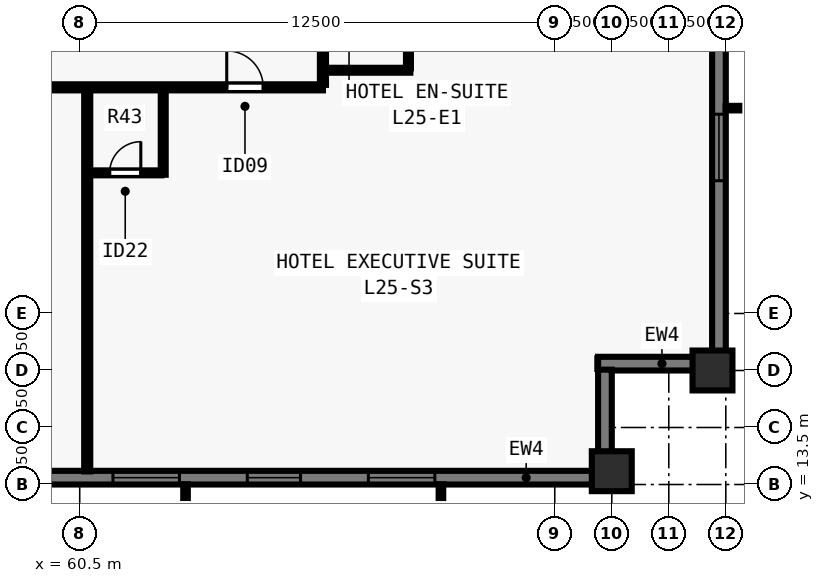
"""IFC4 building model, lengths in metres.
Left out: names, types, materials, properties, quantities, classifications, styles, units other than length and angle.
Written with IfcOpenShell. Run it as: python <this file> out.ifc"""

import sys

from ifc_helpers import new_model, si_unit, direction, frame, frame_2d, origin, origin_2d, place, context, subcontext, project, spatial, rectangle, extrude, element, fill, save


model = new_model("IFC4")
c1 = context("Model", 3, precision=1e-05, world=origin(), true_north=direction((0.0, 1.0)))
c2 = subcontext(c1, "Body", "Model", "MODEL_VIEW")
j1 = project(units=[si_unit("LENGTHUNIT", "METRE"), si_unit("PLANEANGLEUNIT", "RADIAN")], contexts=[c1])
p1 = place(None, origin())
s1 = spatial("IfcSite", under=j1, at=p1, CompositionType="ELEMENT")
p2 = place(p1, origin())
s2 = spatial("IfcBuilding", under=s1, at=p2, CompositionType="ELEMENT")
p3 = place(p2, frame((0.0, 0.0, 93.5)))
s3 = spatial("IfcBuildingStorey", under=s2, at=p3, CompositionType="ELEMENT", Elevation=93.5)
for number, where, z_axis, x_axis in (
    (1, (74.5, 13.85, 0.0), (0.0, 0.0, 1.0), (1.0, 0.0, 0.0)),
    (2, (77.15, 16.5, 0.0), (0.0, 0.0, 1.0), (0.0, 1.0, 0.0)),
):
    element("IfcColumn", number, at=place(p3, frame(where, z_axis=z_axis, x_axis=x_axis)), inside=s3, PredefinedType="COLUMN", context=c2, shape_type="SweptSolid", body=[
        extrude(rectangle(XDim=1.05, YDim=1.05, at=origin_2d()), origin(), (0.0, 0.0, 1.0), 3.5),
    ])
p4 = place(p3, frame((77.32, 61.5, 0.0), z_axis=(0.0, 0.0, 1.0), x_axis=(0.0, -1.0, 0.0)))
e3 = element("IfcWall", 3, at=p4, inside=s3, PredefinedType="SOLIDWALL", context=c2, shape_type="SweptSolid", body=[
    extrude(rectangle(XDim=44.662, YDim=0.36, at=frame_2d((22.331, 0.0))), origin(), (0.0, 0.0, 1.0), 3.24),
])
p5 = place(p4, frame((8.19, 0.0, 0.8)))
e4 = element("IfcOpeningElement", 4, at=p5, cuts=e3, PredefinedType="OPENING", context=c2, shape_type="SweptSolid", body=[
    extrude(rectangle(XDim=1.4, YDim=1.504, at=frame_2d((0.7, 0.752))), frame((0.0, 0.19, 0.0), z_axis=(0.0, -1.0, 0.0), x_axis=(1.0, 0.0, 0.0)), (0.0, 0.0, 1.0), 0.38),
])
p6 = place(p4, frame((11.375, 0.0, 0.8)))
e5 = element("IfcOpeningElement", 5, at=p6, cuts=e3, PredefinedType="OPENING", context=c2, shape_type="SweptSolid", body=[
    extrude(rectangle(XDim=1.75, YDim=1.504, at=frame_2d((0.875, 0.752))), frame((0.0, 0.19, 0.0), z_axis=(0.0, -1.0, 0.0), x_axis=(1.0, 0.0, 0.0)), (0.0, 0.0, 1.0), 0.38),
])
p7 = place(p4, frame((14.911, 0.0, 0.8)))
e6 = element("IfcOpeningElement", 6, at=p7, cuts=e3, PredefinedType="OPENING", context=c2, shape_type="SweptSolid", body=[
    extrude(rectangle(XDim=1.4, YDim=1.504, at=frame_2d((0.7, 0.752))), frame((0.0, 0.19, 0.0), z_axis=(0.0, -1.0, 0.0), x_axis=(1.0, 0.0, 0.0)), (0.0, 0.0, 1.0), 0.38),
])
p8 = place(p4, frame((21.631, 0.0, 0.8)))
e7 = element("IfcOpeningElement", 7, at=p8, cuts=e3, PredefinedType="OPENING", context=c2, shape_type="SweptSolid", body=[
    extrude(rectangle(XDim=1.4, YDim=1.504, at=frame_2d((0.7, 0.752))), frame((0.0, 0.19, 0.0), z_axis=(0.0, -1.0, 0.0), x_axis=(1.0, 0.0, 0.0)), (0.0, 0.0, 1.0), 0.38),
])
p9 = place(p4, frame((23.566, 0.0, 0.8)))
e8 = element("IfcOpeningElement", 8, at=p9, cuts=e3, PredefinedType="OPENING", context=c2, shape_type="SweptSolid", body=[
    extrude(rectangle(XDim=1.75, YDim=1.504, at=frame_2d((0.875, 0.752))), frame((0.0, 0.19, 0.0), z_axis=(0.0, -1.0, 0.0), x_axis=(1.0, 0.0, 0.0)), (0.0, 0.0, 1.0), 0.38),
])
p10 = place(p4, frame((28.351, 0.0, 0.8)))
e9 = element("IfcOpeningElement", 9, at=p10, cuts=e3, PredefinedType="OPENING", context=c2, shape_type="SweptSolid", body=[
    extrude(rectangle(XDim=1.4, YDim=1.504, at=frame_2d((0.7, 0.752))), frame((0.0, 0.19, 0.0), z_axis=(0.0, -1.0, 0.0), x_axis=(1.0, 0.0, 0.0)), (0.0, 0.0, 1.0), 0.38),
])
p11 = place(p4, frame((31.987, 0.0, 0.8)))
e10 = element("IfcOpeningElement", 10, at=p11, cuts=e3, PredefinedType="OPENING", context=c2, shape_type="SweptSolid", body=[
    extrude(rectangle(XDim=1.75, YDim=1.504, at=frame_2d((0.875, 0.752))), frame((0.0, 0.19, 0.0), z_axis=(0.0, -1.0, 0.0), x_axis=(1.0, 0.0, 0.0)), (0.0, 0.0, 1.0), 0.38),
])
p12 = place(p4, frame((35.072, 0.0, 0.8)))
e11 = element("IfcOpeningElement", 11, at=p12, cuts=e3, PredefinedType="OPENING", context=c2, shape_type="SweptSolid", body=[
    extrude(rectangle(XDim=1.4, YDim=1.504, at=frame_2d((0.7, 0.752))), frame((0.0, 0.19, 0.0), z_axis=(0.0, -1.0, 0.0), x_axis=(1.0, 0.0, 0.0)), (0.0, 0.0, 1.0), 0.38),
])
p13 = place(p4, frame((38.257, 0.0, 0.8)))
e12 = element("IfcOpeningElement", 12, at=p13, cuts=e3, PredefinedType="OPENING", context=c2, shape_type="SweptSolid", body=[
    extrude(rectangle(XDim=1.75, YDim=1.504, at=frame_2d((0.875, 0.752))), frame((0.0, 0.19, 0.0), z_axis=(0.0, -1.0, 0.0), x_axis=(1.0, 0.0, 0.0)), (0.0, 0.0, 1.0), 0.38),
])
p14 = place(p3, frame((77.5, 16.68, 0.0), z_axis=(0.0, 0.0, 1.0), x_axis=(-1.0, 0.0, 0.0)))
e13 = element("IfcWall", 13, at=p14, inside=s3, PredefinedType="SOLIDWALL", context=c2, shape_type="SweptSolid", body=[
    extrude(rectangle(XDim=3.36, YDim=0.36, at=frame_2d((1.68, 0.0))), origin(), (0.0, 0.0, 1.0), 3.24),
])
p15 = place(p3, frame((74.32, 16.522, 0.0), z_axis=(0.0, 0.0, 1.0), x_axis=(0.0, -1.0, 0.0)))
e14 = element("IfcWall", 14, at=p15, inside=s3, PredefinedType="SOLIDWALL", context=c2, shape_type="SweptSolid", body=[
    extrude(rectangle(XDim=2.684, YDim=0.36, at=frame_2d((1.342, 0.0))), origin(), (0.0, 0.0, 1.0), 3.24),
])
p16 = place(p3, frame((74.5, 13.68, 0.0), z_axis=(0.0, 0.0, 1.0), x_axis=(-1.0, 0.0, 0.0)))
e15 = element("IfcWall", 15, at=p16, inside=s3, PredefinedType="SOLIDWALL", context=c2, shape_type="SweptSolid", body=[
    extrude(rectangle(XDim=44.662, YDim=0.36, at=frame_2d((22.331, 0.0))), origin(), (0.0, 0.0, 1.0), 3.24),
])
p17 = place(p16, frame((4.655, 0.0, 0.8)))
e16 = element("IfcOpeningElement", 16, at=p17, cuts=e15, PredefinedType="OPENING", context=c2, shape_type="SweptSolid", body=[
    extrude(rectangle(XDim=1.75, YDim=1.504, at=frame_2d((0.875, 0.752))), frame((0.0, 0.19, 0.0), z_axis=(0.0, -1.0, 0.0), x_axis=(1.0, 0.0, 0.0)), (0.0, 0.0, 1.0), 0.38),
])
p18 = place(p16, frame((8.19, 0.0, 0.8)))
e17 = element("IfcOpeningElement", 17, at=p18, cuts=e15, PredefinedType="OPENING", context=c2, shape_type="SweptSolid", body=[
    extrude(rectangle(XDim=1.4, YDim=1.504, at=frame_2d((0.7, 0.752))), frame((0.0, 0.19, 0.0), z_axis=(0.0, -1.0, 0.0), x_axis=(1.0, 0.0, 0.0)), (0.0, 0.0, 1.0), 0.38),
])
p19 = place(p16, frame((11.375, 0.0, 0.8)))
e18 = element("IfcOpeningElement", 18, at=p19, cuts=e15, PredefinedType="OPENING", context=c2, shape_type="SweptSolid", body=[
    extrude(rectangle(XDim=1.75, YDim=1.504, at=frame_2d((0.875, 0.752))), frame((0.0, 0.19, 0.0), z_axis=(0.0, -1.0, 0.0), x_axis=(1.0, 0.0, 0.0)), (0.0, 0.0, 1.0), 0.38),
])
p20 = place(p16, frame((14.911, 0.0, 0.8)))
e19 = element("IfcOpeningElement", 19, at=p20, cuts=e15, PredefinedType="OPENING", context=c2, shape_type="SweptSolid", body=[
    extrude(rectangle(XDim=1.4, YDim=1.504, at=frame_2d((0.7, 0.752))), frame((0.0, 0.19, 0.0), z_axis=(0.0, -1.0, 0.0), x_axis=(1.0, 0.0, 0.0)), (0.0, 0.0, 1.0), 0.38),
])
p21 = place(p16, frame((18.546, 0.0, 0.8)))
e20 = element("IfcOpeningElement", 20, at=p21, cuts=e15, PredefinedType="OPENING", context=c2, shape_type="SweptSolid", body=[
    extrude(rectangle(XDim=1.75, YDim=1.504, at=frame_2d((0.875, 0.752))), frame((0.0, 0.19, 0.0), z_axis=(0.0, -1.0, 0.0), x_axis=(1.0, 0.0, 0.0)), (0.0, 0.0, 1.0), 0.38),
])
p22 = place(p16, frame((21.631, 0.0, 0.8)))
e21 = element("IfcOpeningElement", 21, at=p22, cuts=e15, PredefinedType="OPENING", context=c2, shape_type="SweptSolid", body=[
    extrude(rectangle(XDim=1.4, YDim=1.504, at=frame_2d((0.7, 0.752))), frame((0.0, 0.19, 0.0), z_axis=(0.0, -1.0, 0.0), x_axis=(1.0, 0.0, 0.0)), (0.0, 0.0, 1.0), 0.38),
])
p23 = place(p16, frame((24.366, 0.0, 0.8)))
e22 = element("IfcOpeningElement", 22, at=p23, cuts=e15, PredefinedType="OPENING", context=c2, shape_type="SweptSolid", body=[
    extrude(rectangle(XDim=1.75, YDim=1.504, at=frame_2d((0.875, 0.752))), frame((0.0, 0.19, 0.0), z_axis=(0.0, -1.0, 0.0), x_axis=(1.0, 0.0, 0.0)), (0.0, 0.0, 1.0), 0.38),
])
p24 = place(p16, frame((28.351, 0.0, 0.8)))
e23 = element("IfcOpeningElement", 23, at=p24, cuts=e15, PredefinedType="OPENING", context=c2, shape_type="SweptSolid", body=[
    extrude(rectangle(XDim=1.4, YDim=1.504, at=frame_2d((0.7, 0.752))), frame((0.0, 0.19, 0.0), z_axis=(0.0, -1.0, 0.0), x_axis=(1.0, 0.0, 0.0)), (0.0, 0.0, 1.0), 0.38),
])
p25 = place(p16, frame((31.987, 0.0, 0.8)))
e24 = element("IfcOpeningElement", 24, at=p25, cuts=e15, PredefinedType="OPENING", context=c2, shape_type="SweptSolid", body=[
    extrude(rectangle(XDim=1.75, YDim=1.504, at=frame_2d((0.875, 0.752))), frame((0.0, 0.19, 0.0), z_axis=(0.0, -1.0, 0.0), x_axis=(1.0, 0.0, 0.0)), (0.0, 0.0, 1.0), 0.38),
])
p26 = place(p16, frame((35.072, 0.0, 0.8)))
e25 = element("IfcOpeningElement", 25, at=p26, cuts=e15, PredefinedType="OPENING", context=c2, shape_type="SweptSolid", body=[
    extrude(rectangle(XDim=1.4, YDim=1.504, at=frame_2d((0.7, 0.752))), frame((0.0, 0.19, 0.0), z_axis=(0.0, -1.0, 0.0), x_axis=(1.0, 0.0, 0.0)), (0.0, 0.0, 1.0), 0.38),
])
p27 = place(p16, frame((38.257, 0.0, 0.8)))
e26 = element("IfcOpeningElement", 26, at=p27, cuts=e15, PredefinedType="OPENING", context=c2, shape_type="SweptSolid", body=[
    extrude(rectangle(XDim=1.75, YDim=1.504, at=frame_2d((0.875, 0.752))), frame((0.0, 0.19, 0.0), z_axis=(0.0, -1.0, 0.0), x_axis=(1.0, 0.0, 0.0)), (0.0, 0.0, 1.0), 0.38),
])
p28 = place(p3, frame((37.1, 23.95, 0.0), z_axis=(0.0, 0.0, 1.0), x_axis=(1.0, 0.0, 0.0)))
e27 = element("IfcWall", 27, at=p28, inside=s3, PredefinedType="PARTITIONING", context=c2, shape_type="SweptSolid", body=[
    extrude(rectangle(XDim=29.8, YDim=0.16, at=frame_2d((14.9, 0.0))), origin(), (0.0, 0.0, 1.0), 3.24),
])
p29 = place(p28, frame((2.571, 0.0, 0.0)))
e28 = element("IfcOpeningElement", 28, at=p29, cuts=e27, PredefinedType="OPENING", context=c2, shape_type="SweptSolid", body=[
    extrude(rectangle(XDim=0.96, YDim=2.15, at=frame_2d((0.48, 1.075))), frame((0.0, 0.09, 0.0), z_axis=(0.0, -1.0, 0.0), x_axis=(1.0, 0.0, 0.0)), (0.0, 0.0, 1.0), 0.18),
])
p30 = place(p28, frame((15.42, 0.0, 0.0)))
e29 = element("IfcOpeningElement", 29, at=p30, cuts=e27, PredefinedType="OPENING", context=c2, shape_type="SweptSolid", body=[
    extrude(rectangle(XDim=0.96, YDim=2.15, at=frame_2d((0.48, 1.075))), frame((0.0, 0.09, 0.0), z_axis=(0.0, -1.0, 0.0), x_axis=(1.0, 0.0, 0.0)), (0.0, 0.0, 1.0), 0.18),
])
p31 = place(p28, frame((27.269, 0.0, 0.0)))
e30 = element("IfcOpeningElement", 30, at=p31, cuts=e27, PredefinedType="OPENING", context=c2, shape_type="SweptSolid", body=[
    extrude(rectangle(XDim=0.96, YDim=2.15, at=frame_2d((0.48, 1.075))), frame((0.0, 0.09, 0.0), z_axis=(0.0, -1.0, 0.0), x_axis=(1.0, 0.0, 0.0)), (0.0, 0.0, 1.0), 0.18),
])
p32 = place(p3, frame((66.9, 24.015, 0.0), z_axis=(0.0, 0.0, 1.0), x_axis=(0.0, 1.0, 0.0)))
e31 = element("IfcWall", 31, at=p32, inside=s3, PredefinedType="PARTITIONING", context=c2, shape_type="SweptSolid", body=[
    extrude(rectangle(XDim=29.97, YDim=0.16, at=frame_2d((14.985, 0.0))), origin(), (0.0, 0.0, 1.0), 3.24),
])
p33 = place(p32, frame((3.911, 0.0, 0.0)))
e32 = element("IfcOpeningElement", 32, at=p33, cuts=e31, PredefinedType="OPENING", context=c2, shape_type="SweptSolid", body=[
    extrude(rectangle(XDim=0.96, YDim=2.15, at=frame_2d((0.48, 1.075))), frame((0.0, 0.09, 0.0), z_axis=(0.0, -1.0, 0.0), x_axis=(1.0, 0.0, 0.0)), (0.0, 0.0, 1.0), 0.18),
])
p34 = place(p32, frame((9.544, 0.0, 0.0)))
e33 = element("IfcOpeningElement", 33, at=p34, cuts=e31, PredefinedType="OPENING", context=c2, shape_type="SweptSolid", body=[
    extrude(rectangle(XDim=0.96, YDim=2.15, at=frame_2d((0.48, 1.075))), frame((0.0, 0.09, 0.0), z_axis=(0.0, -1.0, 0.0), x_axis=(1.0, 0.0, 0.0)), (0.0, 0.0, 1.0), 0.18),
])
p35 = place(p32, frame((15.625, 0.0, 0.0)))
e34 = element("IfcOpeningElement", 34, at=p35, cuts=e31, PredefinedType="OPENING", context=c2, shape_type="SweptSolid", body=[
    extrude(rectangle(XDim=0.96, YDim=2.15, at=frame_2d((0.48, 1.075))), frame((0.0, 0.09, 0.0), z_axis=(0.0, -1.0, 0.0), x_axis=(1.0, 0.0, 0.0)), (0.0, 0.0, 1.0), 0.18),
])
p36 = place(p32, frame((21.584, 0.0, 0.0)))
e35 = element("IfcOpeningElement", 35, at=p36, cuts=e31, PredefinedType="OPENING", context=c2, shape_type="SweptSolid", body=[
    extrude(rectangle(XDim=0.96, YDim=2.15, at=frame_2d((0.48, 1.075))), frame((0.0, 0.09, 0.0), z_axis=(0.0, -1.0, 0.0), x_axis=(1.0, 0.0, 0.0)), (0.0, 0.0, 1.0), 0.18),
])
p37 = place(p32, frame((27.494, 0.0, 0.0)))
e36 = element("IfcOpeningElement", 36, at=p37, cuts=e31, PredefinedType="OPENING", context=c2, shape_type="SweptSolid", body=[
    extrude(rectangle(XDim=0.96, YDim=2.15, at=frame_2d((0.48, 1.075))), frame((0.0, 0.09, 0.0), z_axis=(0.0, -1.0, 0.0), x_axis=(1.0, 0.0, 0.0)), (0.0, 0.0, 1.0), 0.18),
])
p38 = place(p3, frame((60.698, 13.845, 0.0), z_axis=(0.0, 0.0, 1.0), x_axis=(0.0, 1.0, 0.0)))
e37 = element("IfcWall", 37, at=p38, inside=s3, PredefinedType="PARTITIONING", context=c2, shape_type="SweptSolid", body=[
    extrude(rectangle(XDim=10.04, YDim=0.16, at=frame_2d((5.02, 0.0))), origin(), (0.0, 0.0, 1.0), 3.24),
])
p39 = place(p3, frame((62.698, 21.65, 0.0), z_axis=(0.0, 0.0, 1.0), x_axis=(0.0, 1.0, 0.0)))
e38 = element("IfcWall", 38, at=p39, inside=s3, PredefinedType="PLUMBINGWALL", context=c2, shape_type="SweptSolid", body=[
    extrude(rectangle(XDim=2.235, YDim=0.13, at=frame_2d((1.118, 0.0))), origin(), (0.0, 0.0, 1.0), 3.24),
])
p40 = place(p3, frame((60.762, 21.7, 0.0), z_axis=(0.0, 0.0, 1.0), x_axis=(1.0, 0.0, 0.0)))
e39 = element("IfcWall", 39, at=p40, inside=s3, PredefinedType="PLUMBINGWALL", context=c2, shape_type="SweptSolid", body=[
    extrude(rectangle(XDim=1.885, YDim=0.13, at=frame_2d((0.942, 0.0))), origin(), (0.0, 0.0, 1.0), 3.24),
])
p41 = place(p40, frame((0.525, 0.0, 0.0)))
e40 = element("IfcOpeningElement", 40, at=p41, cuts=e39, PredefinedType="OPENING", context=c2, shape_type="SweptSolid", body=[
    extrude(rectangle(XDim=0.82, YDim=2.1, at=frame_2d((0.41, 1.05))), frame((0.0, 0.075, 0.0), z_axis=(0.0, -1.0, 0.0), x_axis=(1.0, 0.0, 0.0)), (0.0, 0.0, 1.0), 0.15),
])
p42 = place(p3, frame((66.965, 24.4, 0.0), z_axis=(0.0, 0.0, 1.0), x_axis=(1.0, 0.0, 0.0)))
e41 = element("IfcWall", 41, at=p42, inside=s3, PredefinedType="PLUMBINGWALL", context=c2, shape_type="SweptSolid", body=[
    extrude(rectangle(XDim=2.235, YDim=0.13, at=frame_2d((1.117, 0.0))), origin(), (0.0, 0.0, 1.0), 2.809),
])
p43 = place(p3, frame((69.15, 24.45, 0.0), z_axis=(0.0, 0.0, 1.0), x_axis=(0.0, 1.0, 0.0)))
e42 = element("IfcWall", 42, at=p43, inside=s3, PredefinedType="PLUMBINGWALL", context=c2, shape_type="SweptSolid", body=[
    extrude(rectangle(XDim=1.9, YDim=0.13, at=frame_2d((0.95, 0.0))), origin(), (0.0, 0.0, 1.0), 3.24),
])
p44 = place(p43, frame((0.54, 0.0, 0.0)))
e43 = element("IfcOpeningElement", 43, at=p44, cuts=e42, PredefinedType="OPENING", context=c2, shape_type="SweptSolid", body=[
    extrude(rectangle(XDim=0.82, YDim=2.1, at=frame_2d((0.41, 1.05))), frame((0.0, 0.075, 0.0), z_axis=(0.0, -1.0, 0.0), x_axis=(1.0, 0.0, 0.0)), (0.0, 0.0, 1.0), 0.15),
])
p45 = place(p13, origin())
e44 = element("IfcWindow", 44, at=p45, inside=s3, PartitioningType="SINGLE_PANEL", PredefinedType="WINDOW", context=c2, shape_type="SweptSolid", body=[
    extrude(rectangle(XDim=1.75, YDim=1.504, at=frame_2d((0.875, 0.752))), frame((0.0, -0.05, 0.0), z_axis=(0.0, -1.0, 0.0), x_axis=(1.0, 0.0, 0.0)), (0.0, 0.0, 1.0), 0.06),
])
fill(e12, e44)
p46 = place(p17, origin())
e45 = element("IfcWindow", 45, at=p46, inside=s3, PartitioningType="SINGLE_PANEL", PredefinedType="WINDOW", context=c2, shape_type="SweptSolid", body=[
    extrude(rectangle(XDim=1.75, YDim=1.504, at=frame_2d((0.875, 0.752))), frame((0.0, -0.05, 0.0), z_axis=(0.0, -1.0, 0.0), x_axis=(1.0, 0.0, 0.0)), (0.0, 0.0, 1.0), 0.06),
])
fill(e16, e45)
p47 = place(p18, origin())
e46 = element("IfcWindow", 46, at=p47, inside=s3, PartitioningType="SINGLE_PANEL", PredefinedType="WINDOW", context=c2, shape_type="SweptSolid", body=[
    extrude(rectangle(XDim=1.4, YDim=1.504, at=frame_2d((0.7, 0.752))), frame((0.0, -0.05, 0.0), z_axis=(0.0, -1.0, 0.0), x_axis=(1.0, 0.0, 0.0)), (0.0, 0.0, 1.0), 0.06),
])
fill(e17, e46)
p48 = place(p19, origin())
e47 = element("IfcWindow", 47, at=p48, inside=s3, PartitioningType="SINGLE_PANEL", PredefinedType="WINDOW", context=c2, shape_type="SweptSolid", body=[
    extrude(rectangle(XDim=1.75, YDim=1.504, at=frame_2d((0.875, 0.752))), frame((0.0, -0.05, 0.0), z_axis=(0.0, -1.0, 0.0), x_axis=(1.0, 0.0, 0.0)), (0.0, 0.0, 1.0), 0.06),
])
fill(e18, e47)
p49 = place(p41, origin())
e48 = element("IfcDoor", 48, at=p49, inside=s3, OperationType="SINGLE_SWING_RIGHT", PredefinedType="DOOR", context=c2, shape_type="SweptSolid", body=[
    extrude(rectangle(XDim=0.82, YDim=2.1, at=frame_2d((0.41, 1.05))), frame((0.0, 0.025, 0.0), z_axis=(0.0, -1.0, 0.0), x_axis=(1.0, 0.0, 0.0)), (0.0, 0.0, 1.0), 0.05),
])
fill(e40, e48)
p50 = place(p31, origin())
e49 = element("IfcDoor", 49, at=p50, inside=s3, OperationType="SINGLE_SWING_LEFT", PredefinedType="DOOR", context=c2, shape_type="SweptSolid", body=[
    extrude(rectangle(XDim=0.96, YDim=2.15, at=frame_2d((0.48, 1.075))), frame((0.0, 0.025, 0.0), z_axis=(0.0, -1.0, 0.0), x_axis=(1.0, 0.0, 0.0)), (0.0, 0.0, 1.0), 0.05),
])
fill(e30, e49)
save(model, sys.argv[1])
